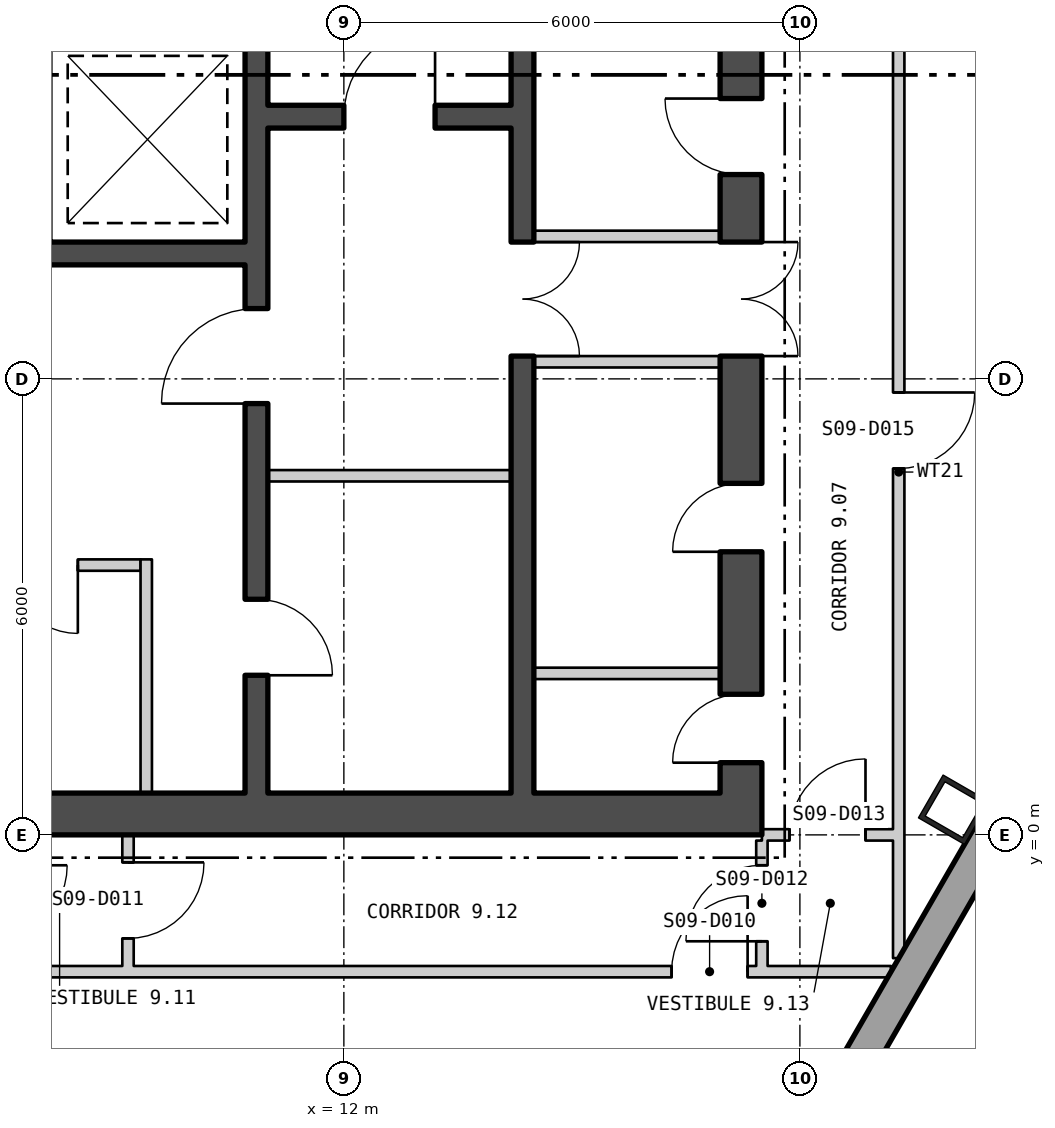
"""IFC4 building model, lengths in metres.
Left out: names, types, materials, properties, quantities, classifications, styles, units other than length and angle.
Written with IfcOpenShell. Run it as: python <this file> out.ifc"""

import sys

from ifc_helpers import new_model, si_unit, direction, frame, frame_2d, origin, origin_2d, place, context, subcontext, project, spatial, polyline, rectangle, hollow_rectangle, outline, extrude, element, fill, save


model = new_model("IFC4")
c1 = context("Model", 3, precision=1e-05, world=origin(), true_north=direction((0.0, 1.0)))
c2 = subcontext(c1, "Body", "Model", "MODEL_VIEW")
j1 = project(units=[si_unit("LENGTHUNIT", "METRE"), si_unit("PLANEANGLEUNIT", "RADIAN")], contexts=[c1])
p1 = place(None, origin())
s1 = spatial("IfcSite", under=j1, at=p1, CompositionType="ELEMENT")
p2 = place(p1, origin())
s2 = spatial("IfcBuilding", under=s1, at=p2, CompositionType="ELEMENT")
p3 = place(p2, frame((0.0, 0.0, 124.8)))
s3 = spatial("IfcBuildingStorey", under=s2, at=p3, CompositionType="ELEMENT", Elevation=124.8)
p4 = place(p3, frame((20.025, 0.331, 0.0), z_axis=(0.0, 0.0, 1.0), x_axis=(0.5, 0.866025403784, 0.0)))
e1 = element("IfcColumn", 1, at=p4, inside=s3, PredefinedType="COLUMN", context=c2, shape_type="SweptSolid", body=[
    extrude(hollow_rectangle(XDim=0.65, YDim=0.7, WallThickness=0.065, at=origin_2d()), origin(), (0.0, 0.0, 1.0), 4.5),
])
p5 = place(p3, frame((4.58, -27.57, -0.18), z_axis=(0.0, 0.0, 1.0), x_axis=(0.500000711659, 0.866024992908, 0.0)))
e2 = element("IfcWall", 2, at=p5, inside=s3, PredefinedType="SOLIDWALL", context=c2, shape_type="SweptSolid", body=[
    extrude(outline(polyline([(-0.13, -0.225), (45.87, -0.225), (45.61, 0.225), (0.13, 0.225), (-0.13, -0.225)])), origin(), (0.0, 0.0, 1.0), 4.28),
])
p6 = place(p5, frame((1.424, 0.0, 1.08)))
e3 = element("IfcOpeningElement", 3, at=p6, cuts=e2, PredefinedType="OPENING", context=c2, shape_type="SweptSolid", body=[
    extrude(rectangle(XDim=2.4, YDim=2.6, at=frame_2d((1.2, 1.3))), frame((0.0, 0.235, 0.0), z_axis=(0.0, -1.0, 0.0), x_axis=(1.0, 0.0, 0.0)), (0.0, 0.0, 1.0), 0.47),
])
p7 = place(p5, frame((5.893, 0.0, 1.08)))
e4 = element("IfcOpeningElement", 4, at=p7, cuts=e2, PredefinedType="OPENING", context=c2, shape_type="SweptSolid", body=[
    extrude(rectangle(XDim=2.4, YDim=2.6, at=frame_2d((1.2, 1.3))), frame((0.0, 0.235, 0.0), z_axis=(0.0, -1.0, 0.0), x_axis=(1.0, 0.0, 0.0)), (0.0, 0.0, 1.0), 0.47),
])
p8 = place(p5, frame((10.401, 0.0, 1.08)))
e5 = element("IfcOpeningElement", 5, at=p8, cuts=e2, PredefinedType="OPENING", context=c2, shape_type="SweptSolid", body=[
    extrude(rectangle(XDim=2.4, YDim=2.6, at=frame_2d((1.2, 1.3))), frame((0.0, 0.235, 0.0), z_axis=(0.0, -1.0, 0.0), x_axis=(1.0, 0.0, 0.0)), (0.0, 0.0, 1.0), 0.47),
])
p9 = place(p5, frame((14.909, 0.0, 1.08)))
e6 = element("IfcOpeningElement", 6, at=p9, cuts=e2, PredefinedType="OPENING", context=c2, shape_type="SweptSolid", body=[
    extrude(rectangle(XDim=2.4, YDim=2.6, at=frame_2d((1.2, 1.3))), frame((0.0, 0.235, 0.0), z_axis=(0.0, -1.0, 0.0), x_axis=(1.0, 0.0, 0.0)), (0.0, 0.0, 1.0), 0.47),
])
p10 = place(p5, frame((19.416, 0.0, 1.08)))
e7 = element("IfcOpeningElement", 7, at=p10, cuts=e2, PredefinedType="OPENING", context=c2, shape_type="SweptSolid", body=[
    extrude(rectangle(XDim=2.4, YDim=2.6, at=frame_2d((1.2, 1.3))), frame((0.0, 0.235, 0.0), z_axis=(0.0, -1.0, 0.0), x_axis=(1.0, 0.0, 0.0)), (0.0, 0.0, 1.0), 0.47),
])
p11 = place(p5, frame((23.924, 0.0, 1.08)))
e8 = element("IfcOpeningElement", 8, at=p11, cuts=e2, PredefinedType="OPENING", context=c2, shape_type="SweptSolid", body=[
    extrude(rectangle(XDim=2.4, YDim=2.6, at=frame_2d((1.2, 1.3))), frame((0.0, 0.235, 0.0), z_axis=(0.0, -1.0, 0.0), x_axis=(1.0, 0.0, 0.0)), (0.0, 0.0, 1.0), 0.47),
])
p12 = place(p5, frame((32.939, 0.0, 1.08)))
e9 = element("IfcOpeningElement", 9, at=p12, cuts=e2, PredefinedType="OPENING", context=c2, shape_type="SweptSolid", body=[
    extrude(rectangle(XDim=2.4, YDim=2.6, at=frame_2d((1.2, 1.3))), frame((0.0, 0.235, 0.0), z_axis=(0.0, -1.0, 0.0), x_axis=(1.0, 0.0, 0.0)), (0.0, 0.0, 1.0), 0.47),
])
p13 = place(p5, frame((37.447, 0.0, 1.08)))
e10 = element("IfcOpeningElement", 10, at=p13, cuts=e2, PredefinedType="OPENING", context=c2, shape_type="SweptSolid", body=[
    extrude(rectangle(XDim=2.4, YDim=2.6, at=frame_2d((1.2, 1.3))), frame((0.0, 0.235, 0.0), z_axis=(0.0, -1.0, 0.0), x_axis=(1.0, 0.0, 0.0)), (0.0, 0.0, 1.0), 0.47),
])
p14 = place(p5, frame((41.916, 0.0, 1.08)))
e11 = element("IfcOpeningElement", 11, at=p14, cuts=e2, PredefinedType="OPENING", context=c2, shape_type="SweptSolid", body=[
    extrude(rectangle(XDim=2.4, YDim=2.6, at=frame_2d((1.2, 1.3))), frame((0.0, 0.235, 0.0), z_axis=(0.0, -1.0, 0.0), x_axis=(1.0, 0.0, 0.0)), (0.0, 0.0, 1.0), 0.47),
])
p15 = place(p3, frame((-17.5, 0.275, 0.0), z_axis=(0.0, 0.0, 1.0), x_axis=(1.0, 0.0, 0.0)))
e12 = element("IfcWall", 12, at=p15, inside=s3, PredefinedType="SHEAR", context=c2, shape_type="SweptSolid", body=[
    extrude(rectangle(XDim=35.0, YDim=0.55, at=frame_2d((17.5, 0.0))), origin(), (0.0, 0.0, 1.0), 4.3),
])
p16 = place(p15, frame((12.0, 0.0, 0.0)))
e13 = element("IfcOpeningElement", 13, at=p16, cuts=e12, PredefinedType="OPENING", context=c2, shape_type="SweptSolid", body=[
    extrude(rectangle(XDim=1.8, YDim=2.4, at=frame_2d((0.9, 1.2))), frame((0.0, 0.285, 0.0), z_axis=(0.0, -1.0, 0.0), x_axis=(1.0, 0.0, 0.0)), (0.0, 0.0, 1.0), 0.57),
])
p17 = place(p15, frame((22.0, 0.0, 0.0)))
e14 = element("IfcOpeningElement", 14, at=p17, cuts=e12, PredefinedType="OPENING", context=c2, shape_type="SweptSolid", body=[
    extrude(rectangle(XDim=1.8, YDim=2.4, at=frame_2d((0.9, 1.2))), frame((0.0, 0.285, 0.0), z_axis=(0.0, -1.0, 0.0), x_axis=(1.0, 0.0, 0.0)), (0.0, 0.0, 1.0), 0.57),
])
p18 = place(p3, frame((17.225, 0.55, 0.0), z_axis=(0.0, 0.0, 1.0), x_axis=(0.0, 1.0, 0.0)))
e15 = element("IfcWall", 15, at=p18, inside=s3, PredefinedType="SHEAR", context=c2, shape_type="SweptSolid", body=[
    extrude(rectangle(XDim=16.9, YDim=0.55, at=frame_2d((8.45, 0.0))), origin(), (0.0, 0.0, 1.0), 4.3),
])
p19 = place(p18, frame((5.75, 0.0, 0.0)))
e16 = element("IfcOpeningElement", 16, at=p19, cuts=e15, PredefinedType="OPENING", context=c2, shape_type="SweptSolid", body=[
    extrude(rectangle(XDim=1.5, YDim=2.1, at=frame_2d((0.75, 1.05))), frame((0.0, 0.285, 0.0), z_axis=(0.0, -1.0, 0.0), x_axis=(1.0, 0.0, 0.0)), (0.0, 0.0, 1.0), 0.57),
])
p20 = place(p18, frame((0.4, 0.0, 0.0)))
e17 = element("IfcOpeningElement", 17, at=p20, cuts=e15, PredefinedType="OPENING", context=c2, shape_type="SweptSolid", body=[
    extrude(rectangle(XDim=0.9, YDim=2.1, at=frame_2d((0.45, 1.05))), frame((0.0, 0.285, 0.0), z_axis=(0.0, -1.0, 0.0), x_axis=(1.0, 0.0, 0.0)), (0.0, 0.0, 1.0), 0.57),
])
p21 = place(p18, frame((3.175, 0.0, 0.0)))
e18 = element("IfcOpeningElement", 18, at=p21, cuts=e15, PredefinedType="OPENING", context=c2, shape_type="SweptSolid", body=[
    extrude(rectangle(XDim=0.9, YDim=2.1, at=frame_2d((0.45, 1.05))), frame((0.0, 0.285, 0.0), z_axis=(0.0, -1.0, 0.0), x_axis=(1.0, 0.0, 0.0)), (0.0, 0.0, 1.0), 0.57),
])
p22 = place(p18, frame((8.139, 0.0, 0.0)))
e19 = element("IfcOpeningElement", 19, at=p22, cuts=e15, PredefinedType="OPENING", context=c2, shape_type="SweptSolid", body=[
    extrude(rectangle(XDim=1.0, YDim=2.1, at=frame_2d((0.5, 1.05))), frame((0.0, 0.285, 0.0), z_axis=(0.0, -1.0, 0.0), x_axis=(1.0, 0.0, 0.0)), (0.0, 0.0, 1.0), 0.57),
])
p23 = place(p18, frame((11.877, 0.0, 0.0)))
e20 = element("IfcOpeningElement", 20, at=p23, cuts=e15, PredefinedType="OPENING", context=c2, shape_type="SweptSolid", body=[
    extrude(rectangle(XDim=0.9, YDim=2.1, at=frame_2d((0.45, 1.05))), frame((0.0, 0.285, 0.0), z_axis=(0.0, -1.0, 0.0), x_axis=(1.0, 0.0, 0.0)), (0.0, 0.0, 1.0), 0.57),
])
p24 = place(p18, frame((15.389, 0.0, 0.0)))
e21 = element("IfcOpeningElement", 21, at=p24, cuts=e15, PredefinedType="OPENING", context=c2, shape_type="SweptSolid", body=[
    extrude(rectangle(XDim=0.9, YDim=2.1, at=frame_2d((0.45, 1.05))), frame((0.0, 0.285, 0.0), z_axis=(0.0, -1.0, 0.0), x_axis=(1.0, 0.0, 0.0)), (0.0, 0.0, 1.0), 0.57),
])
p25 = place(p3, frame((10.85, 0.55, 0.0), z_axis=(0.0, 0.0, 1.0), x_axis=(0.0, 1.0, 0.0)))
e22 = element("IfcWall", 22, at=p25, inside=s3, PredefinedType="SHEAR", context=c2, shape_type="SweptSolid", body=[
    extrude(rectangle(XDim=16.9, YDim=0.3, at=frame_2d((8.45, 0.0))), origin(), (0.0, 0.0, 1.0), 4.3),
])
p26 = place(p25, frame((5.125, 0.0, 0.0)))
e23 = element("IfcOpeningElement", 23, at=p26, cuts=e22, PredefinedType="OPENING", context=c2, shape_type="SweptSolid", body=[
    extrude(rectangle(XDim=1.25, YDim=2.1, at=frame_2d((0.625, 1.05))), frame((0.0, 0.16, 0.0), z_axis=(0.0, -1.0, 0.0), x_axis=(1.0, 0.0, 0.0)), (0.0, 0.0, 1.0), 0.32),
])
p27 = place(p25, frame((1.55, 0.0, 0.0)))
e24 = element("IfcOpeningElement", 24, at=p27, cuts=e22, PredefinedType="OPENING", context=c2, shape_type="SweptSolid", body=[
    extrude(rectangle(XDim=1.0, YDim=2.1, at=frame_2d((0.5, 1.05))), frame((0.0, 0.16, 0.0), z_axis=(0.0, -1.0, 0.0), x_axis=(1.0, 0.0, 0.0)), (0.0, 0.0, 1.0), 0.32),
])
p28 = place(p3, frame((14.35, 0.55, 0.0), z_axis=(0.0, 0.0, 1.0), x_axis=(0.0, 1.0, 0.0)))
e25 = element("IfcWall", 25, at=p28, inside=s3, PredefinedType="SHEAR", context=c2, shape_type="SweptSolid", body=[
    extrude(rectangle(XDim=16.9, YDim=0.3, at=frame_2d((8.45, 0.0))), origin(), (0.0, 0.0, 1.0), 4.3),
])
p29 = place(p28, frame((5.75, 0.0, 0.0)))
e26 = element("IfcOpeningElement", 26, at=p29, cuts=e25, PredefinedType="OPENING", context=c2, shape_type="SweptSolid", body=[
    extrude(rectangle(XDim=1.5, YDim=2.1, at=frame_2d((0.75, 1.05))), frame((0.0, 0.16, 0.0), z_axis=(0.0, -1.0, 0.0), x_axis=(1.0, 0.0, 0.0)), (0.0, 0.0, 1.0), 0.32),
])
p30 = place(p3, frame((11.0, 9.45, 0.0), z_axis=(0.0, 0.0, 1.0), x_axis=(1.0, 0.0, 0.0)))
e27 = element("IfcWall", 27, at=p30, inside=s3, PredefinedType="SHEAR", context=c2, shape_type="SweptSolid", body=[
    extrude(rectangle(XDim=3.2, YDim=0.3, at=frame_2d((1.6, 0.0))), origin(), (0.0, 0.0, 1.0), 4.3),
])
p31 = place(p30, frame((1.0, 0.0, 0.0)))
e28 = element("IfcOpeningElement", 28, at=p31, cuts=e27, PredefinedType="OPENING", context=c2, shape_type="SweptSolid", body=[
    extrude(rectangle(XDim=1.2, YDim=2.1, at=frame_2d((0.6, 1.05))), frame((0.0, 0.16, 0.0), z_axis=(0.0, -1.0, 0.0), x_axis=(1.0, 0.0, 0.0)), (0.0, 0.0, 1.0), 0.32),
])
p32 = place(p3, frame((2.6, 7.65, 0.0), z_axis=(0.0, 0.0, 1.0), x_axis=(1.0, 0.0, 0.0)))
e29 = element("IfcWall", 29, at=p32, inside=s3, PredefinedType="SHEAR", context=c2, shape_type="SweptSolid", body=[
    extrude(rectangle(XDim=8.1, YDim=0.3, at=frame_2d((4.05, 0.0))), origin(), (0.0, 0.0, 1.0), 4.3),
])
p33 = place(p3, frame((11.0, 4.725, 0.0), z_axis=(0.0, 0.0, 1.0), x_axis=(1.0, 0.0, 0.0)))
e30 = element("IfcWall", 30, at=p33, inside=s3, PredefinedType="PARTITIONING", context=c2, shape_type="SweptSolid", body=[
    extrude(rectangle(XDim=3.2, YDim=0.15, at=frame_2d((1.6, 0.0))), origin(), (0.0, 0.0, 1.0), 4.3),
])
for number, where, z_axis, x_axis in (
    (31, (14.5, 6.225, 0.0), (0.0, 0.0, 1.0), (1.0, 0.0, 0.0)),
    (32, (14.5, 7.875, 0.0), (0.0, 0.0, 1.0), (1.0, 0.0, 0.0)),
    (33, (14.5, 2.125, 0.0), (0.0, 0.0, 1.0), (1.0, 0.0, 0.0)),
):
    element("IfcWall", number, at=place(p3, frame(where, z_axis=z_axis, x_axis=x_axis)), inside=s3, PredefinedType="PARTITIONING", context=c2, shape_type="SweptSolid", body=[
        extrude(rectangle(XDim=2.45, YDim=0.15, at=frame_2d((1.225, 0.0))), origin(), (0.0, 0.0, 1.0), 4.3),
    ])
p34 = place(p3, frame((9.4, 0.55, 0.0), z_axis=(0.0, 0.0, 1.0), x_axis=(0.0, 1.0, 0.0)))
e34 = element("IfcWall", 34, at=p34, inside=s3, PredefinedType="PARTITIONING", context=c2, shape_type="SweptSolid", body=[
    extrude(rectangle(XDim=3.075, YDim=0.15, at=frame_2d((1.538, 0.0))), origin(), (0.0, 0.0, 1.0), 4.3),
])
p35 = place(p3, frame((6.775, 3.55, 0.0), z_axis=(0.0, 0.0, 1.0), x_axis=(1.0, 0.0, 0.0)))
e35 = element("IfcWall", 35, at=p35, inside=s3, PredefinedType="PARTITIONING", context=c2, shape_type="SweptSolid", body=[
    extrude(rectangle(XDim=2.55, YDim=0.15, at=frame_2d((1.275, 0.0))), origin(), (0.0, 0.0, 1.0), 4.3),
])
p36 = place(p35, frame((0.825, 0.0, 0.0)))
e36 = element("IfcOpeningElement", 36, at=p36, cuts=e35, PredefinedType="OPENING", context=c2, shape_type="SweptSolid", body=[
    extrude(rectangle(XDim=0.9, YDim=2.1, at=frame_2d((0.45, 1.05))), frame((0.0, 0.085, 0.0), z_axis=(0.0, -1.0, 0.0), x_axis=(1.0, 0.0, 0.0)), (0.0, 0.0, 1.0), 0.17),
])
p37 = place(p3, frame((7.435, -1.8, 0.0), z_axis=(0.0, 0.0, 1.0), x_axis=(1.0, 0.0, 0.0)))
e37 = element("IfcWall", 37, at=p37, inside=s3, PredefinedType="PARTITIONING", context=c2, shape_type="SweptSolid", body=[
    extrude(rectangle(XDim=11.763, YDim=0.15, at=frame_2d((5.881, 0.0))), origin(), (0.0, 0.0, 1.0), 4.3),
])
p38 = place(p37, frame((8.877, 0.0, 0.0)))
e38 = element("IfcOpeningElement", 38, at=p38, cuts=e37, PredefinedType="OPENING", context=c2, shape_type="SweptSolid", body=[
    extrude(rectangle(XDim=1.0, YDim=2.1, at=frame_2d((0.5, 1.05))), frame((0.0, 0.085, 0.0), z_axis=(0.0, -1.0, 0.0), x_axis=(1.0, 0.0, 0.0)), (0.0, 0.0, 1.0), 0.17),
])
p39 = place(p3, frame((9.16, -1.725, 0.0), z_axis=(0.0, 0.0, 1.0), x_axis=(0.0, 1.0, 0.0)))
e39 = element("IfcWall", 39, at=p39, inside=s3, PredefinedType="PARTITIONING", context=c2, shape_type="SweptSolid", body=[
    extrude(rectangle(XDim=1.725, YDim=0.15, at=frame_2d((0.863, 0.0))), origin(), (0.0, 0.0, 1.0), 4.3),
])
p40 = place(p39, frame((0.363, 0.0, 0.0)))
e40 = element("IfcOpeningElement", 40, at=p40, cuts=e39, PredefinedType="OPENING", context=c2, shape_type="SweptSolid", body=[
    extrude(rectangle(XDim=1.0, YDim=2.1, at=frame_2d((0.5, 1.05))), frame((0.0, 0.085, 0.0), z_axis=(0.0, -1.0, 0.0), x_axis=(1.0, 0.0, 0.0)), (0.0, 0.0, 1.0), 0.17),
])
p41 = place(p3, frame((17.5, -1.725, 0.0), z_axis=(0.0, 0.0, 1.0), x_axis=(0.0, 1.0, 0.0)))
e41 = element("IfcWall", 41, at=p41, inside=s3, PredefinedType="PARTITIONING", context=c2, shape_type="SweptSolid", body=[
    extrude(rectangle(XDim=1.65, YDim=0.15, at=frame_2d((0.825, 0.0))), origin(), (0.0, 0.0, 1.0), 4.3),
])
p42 = place(p41, frame((0.325, 0.0, 0.0)))
e42 = element("IfcOpeningElement", 42, at=p42, cuts=e41, PredefinedType="OPENING", context=c2, shape_type="SweptSolid", body=[
    extrude(rectangle(XDim=1.0, YDim=2.1, at=frame_2d((0.5, 1.05))), frame((0.0, 0.085, 0.0), z_axis=(0.0, -1.0, 0.0), x_axis=(1.0, 0.0, 0.0)), (0.0, 0.0, 1.0), 0.17),
])
p43 = place(p3, frame((17.5, 0.0, 0.0), z_axis=(0.0, 0.0, 1.0), x_axis=(1.0, 0.0, 0.0)))
e43 = element("IfcWall", 43, at=p43, inside=s3, PredefinedType="PARTITIONING", context=c2, shape_type="SweptSolid", body=[
    extrude(rectangle(XDim=1.725, YDim=0.15, at=frame_2d((0.863, 0.0))), origin(), (0.0, 0.0, 1.0), 3.7),
])
p44 = place(p43, frame((0.363, 0.0, 0.0)))
e44 = element("IfcOpeningElement", 44, at=p44, cuts=e43, PredefinedType="OPENING", context=c2, shape_type="SweptSolid", body=[
    extrude(rectangle(XDim=1.0, YDim=2.1, at=frame_2d((0.5, 1.05))), frame((0.0, 0.085, 0.0), z_axis=(0.0, -1.0, 0.0), x_axis=(1.0, 0.0, 0.0)), (0.0, 0.0, 1.0), 0.17),
])
p45 = place(p3, frame((19.3, -1.622, 0.0), z_axis=(0.0, 0.0, 1.0), x_axis=(0.0, 1.0, 0.0)))
e45 = element("IfcWall", 45, at=p45, inside=s3, PredefinedType="PARTITIONING", context=c2, shape_type="SweptSolid", body=[
    extrude(rectangle(XDim=12.792, YDim=0.15, at=frame_2d((6.396, 0.0))), origin(), (0.0, 0.0, 1.0), 4.3),
])
p46 = place(p45, frame((6.443, 0.0, 0.0)))
e46 = element("IfcOpeningElement", 46, at=p46, cuts=e45, PredefinedType="OPENING", context=c2, shape_type="SweptSolid", body=[
    extrude(rectangle(XDim=1.0, YDim=2.1, at=frame_2d((0.5, 1.05))), frame((0.0, 0.085, 0.0), z_axis=(0.0, -1.0, 0.0), x_axis=(1.0, 0.0, 0.0)), (0.0, 0.0, 1.0), 0.17),
])
p47 = place(p3, frame((19.4, 11.101, 0.0), z_axis=(0.0, 0.0, 1.0), x_axis=(0.866048401274, -0.499960165064, 0.0)))
e47 = element("IfcWall", 47, at=p47, inside=s3, PredefinedType="PARTITIONING", context=c2, shape_type="SweptSolid", body=[
    extrude(rectangle(XDim=5.827, YDim=0.1, at=frame_2d((2.913, 0.0))), origin(), (0.0, 0.0, 1.0), 4.3),
])
p48 = place(p31, origin())
e48 = element("IfcDoor", 48, at=p48, inside=s3, OperationType="SINGLE_SWING_LEFT", PredefinedType="DOOR", context=c2, shape_type="SweptSolid", body=[
    extrude(rectangle(XDim=1.2, YDim=2.1, at=frame_2d((0.6, 1.05))), frame((0.0, 0.025, 0.0), z_axis=(0.0, -1.0, 0.0), x_axis=(1.0, 0.0, 0.0)), (0.0, 0.0, 1.0), 0.05),
])
fill(e28, e48)
p49 = place(p26, origin())
e49 = element("IfcDoor", 49, at=p49, inside=s3, OperationType="SINGLE_SWING_RIGHT", PredefinedType="DOOR", context=c2, shape_type="SweptSolid", body=[
    extrude(rectangle(XDim=1.25, YDim=2.1, at=frame_2d((0.625, 1.05))), frame((0.0, 0.025, 0.0), z_axis=(0.0, -1.0, 0.0), x_axis=(1.0, 0.0, 0.0)), (0.0, 0.0, 1.0), 0.05),
])
fill(e23, e49)
p50 = place(p27, origin())
e50 = element("IfcDoor", 50, at=p50, inside=s3, OperationType="SINGLE_SWING_LEFT", PredefinedType="DOOR", context=c2, shape_type="SweptSolid", body=[
    extrude(rectangle(XDim=1.0, YDim=2.1, at=frame_2d((0.5, 1.05))), frame((0.0, 0.025, 0.0), z_axis=(0.0, -1.0, 0.0), x_axis=(1.0, 0.0, 0.0)), (0.0, 0.0, 1.0), 0.05),
])
fill(e24, e50)
p51 = place(p29, origin())
e51 = element("IfcDoor", 51, at=p51, inside=s3, OperationType="DOUBLE_DOOR_SINGLE_SWING", PredefinedType="DOOR", context=c2, shape_type="SweptSolid", body=[
    extrude(rectangle(XDim=1.5, YDim=2.1, at=frame_2d((0.75, 1.05))), frame((0.0, 0.025, 0.0), z_axis=(0.0, -1.0, 0.0), x_axis=(1.0, 0.0, 0.0)), (0.0, 0.0, 1.0), 0.05),
])
fill(e26, e51)
p52 = place(p19, origin())
e52 = element("IfcDoor", 52, at=p52, inside=s3, OperationType="DOUBLE_DOOR_SINGLE_SWING", PredefinedType="DOOR", context=c2, shape_type="SweptSolid", body=[
    extrude(rectangle(XDim=1.5, YDim=2.1, at=frame_2d((0.75, 1.05))), frame((0.0, 0.025, 0.0), z_axis=(0.0, -1.0, 0.0), x_axis=(1.0, 0.0, 0.0)), (0.0, 0.0, 1.0), 0.05),
])
fill(e16, e52)
p53 = place(p20, origin())
e53 = element("IfcDoor", 53, at=p53, inside=s3, OperationType="SINGLE_SWING_RIGHT", PredefinedType="DOOR", context=c2, shape_type="SweptSolid", body=[
    extrude(rectangle(XDim=0.9, YDim=2.1, at=frame_2d((0.45, 1.05))), frame((0.0, 0.025, 0.0), z_axis=(0.0, -1.0, 0.0), x_axis=(1.0, 0.0, 0.0)), (0.0, 0.0, 1.0), 0.05),
])
fill(e17, e53)
p54 = place(p21, origin())
e54 = element("IfcDoor", 54, at=p54, inside=s3, OperationType="SINGLE_SWING_RIGHT", PredefinedType="DOOR", context=c2, shape_type="SweptSolid", body=[
    extrude(rectangle(XDim=0.9, YDim=2.1, at=frame_2d((0.45, 1.05))), frame((0.0, 0.025, 0.0), z_axis=(0.0, -1.0, 0.0), x_axis=(1.0, 0.0, 0.0)), (0.0, 0.0, 1.0), 0.05),
])
fill(e18, e54)
p55 = place(p22, origin())
e55 = element("IfcDoor", 55, at=p55, inside=s3, OperationType="SINGLE_SWING_LEFT", PredefinedType="DOOR", context=c2, shape_type="SweptSolid", body=[
    extrude(rectangle(XDim=1.0, YDim=2.1, at=frame_2d((0.5, 1.05))), frame((0.0, 0.025, 0.0), z_axis=(0.0, -1.0, 0.0), x_axis=(1.0, 0.0, 0.0)), (0.0, 0.0, 1.0), 0.05),
])
fill(e19, e55)
p56 = place(p36, origin())
e56 = element("IfcDoor", 56, at=p56, inside=s3, OperationType="SINGLE_SWING_RIGHT", PredefinedType="DOOR", context=c2, shape_type="SweptSolid", body=[
    extrude(rectangle(XDim=0.9, YDim=2.1, at=frame_2d((0.45, 1.05))), frame((0.0, 0.025, 0.0), z_axis=(0.0, -1.0, 0.0), x_axis=(1.0, 0.0, 0.0)), (0.0, 0.0, 1.0), 0.05),
])
fill(e36, e56)
p57 = place(p38, origin())
e57 = element("IfcDoor", 57, at=p57, inside=s3, OperationType="SINGLE_SWING_LEFT", PredefinedType="DOOR", context=c2, shape_type="SweptSolid", body=[
    extrude(rectangle(XDim=1.0, YDim=2.1, at=frame_2d((0.5, 1.05))), frame((0.0, 0.025, 0.0), z_axis=(0.0, -1.0, 0.0), x_axis=(1.0, 0.0, 0.0)), (0.0, 0.0, 1.0), 0.05),
])
fill(e38, e57)
p58 = place(p40, origin())
e58 = element("IfcDoor", 58, at=p58, inside=s3, OperationType="SINGLE_SWING_RIGHT", PredefinedType="DOOR", context=c2, shape_type="SweptSolid", body=[
    extrude(rectangle(XDim=1.0, YDim=2.1, at=frame_2d((0.5, 1.05))), frame((0.0, 0.025, 0.0), z_axis=(0.0, -1.0, 0.0), x_axis=(1.0, 0.0, 0.0)), (0.0, 0.0, 1.0), 0.05),
])
fill(e40, e58)
p59 = place(p42, origin())
e59 = element("IfcDoor", 59, at=p59, inside=s3, OperationType="SINGLE_SWING_RIGHT", PredefinedType="DOOR", context=c2, shape_type="SweptSolid", body=[
    extrude(rectangle(XDim=1.0, YDim=2.1, at=frame_2d((0.5, 1.05))), frame((0.0, 0.025, 0.0), z_axis=(0.0, -1.0, 0.0), x_axis=(1.0, 0.0, 0.0)), (0.0, 0.0, 1.0), 0.05),
])
fill(e42, e59)
p60 = place(p44, origin())
e60 = element("IfcDoor", 60, at=p60, inside=s3, OperationType="SINGLE_SWING_LEFT", PredefinedType="DOOR", context=c2, shape_type="SweptSolid", body=[
    extrude(rectangle(XDim=1.0, YDim=2.1, at=frame_2d((0.5, 1.05))), frame((0.0, 0.025, 0.0), z_axis=(0.0, -1.0, 0.0), x_axis=(1.0, 0.0, 0.0)), (0.0, 0.0, 1.0), 0.05),
])
fill(e44, e60)
p61 = place(p46, origin())
e61 = element("IfcDoor", 61, at=p61, inside=s3, OperationType="SINGLE_SWING_RIGHT", PredefinedType="DOOR", context=c2, shape_type="SweptSolid", body=[
    extrude(rectangle(XDim=1.0, YDim=2.1, at=frame_2d((0.5, 1.05))), frame((0.0, 0.025, 0.0), z_axis=(0.0, -1.0, 0.0), x_axis=(1.0, 0.0, 0.0)), (0.0, 0.0, 1.0), 0.05),
])
fill(e46, e61)
save(model, sys.argv[1])
